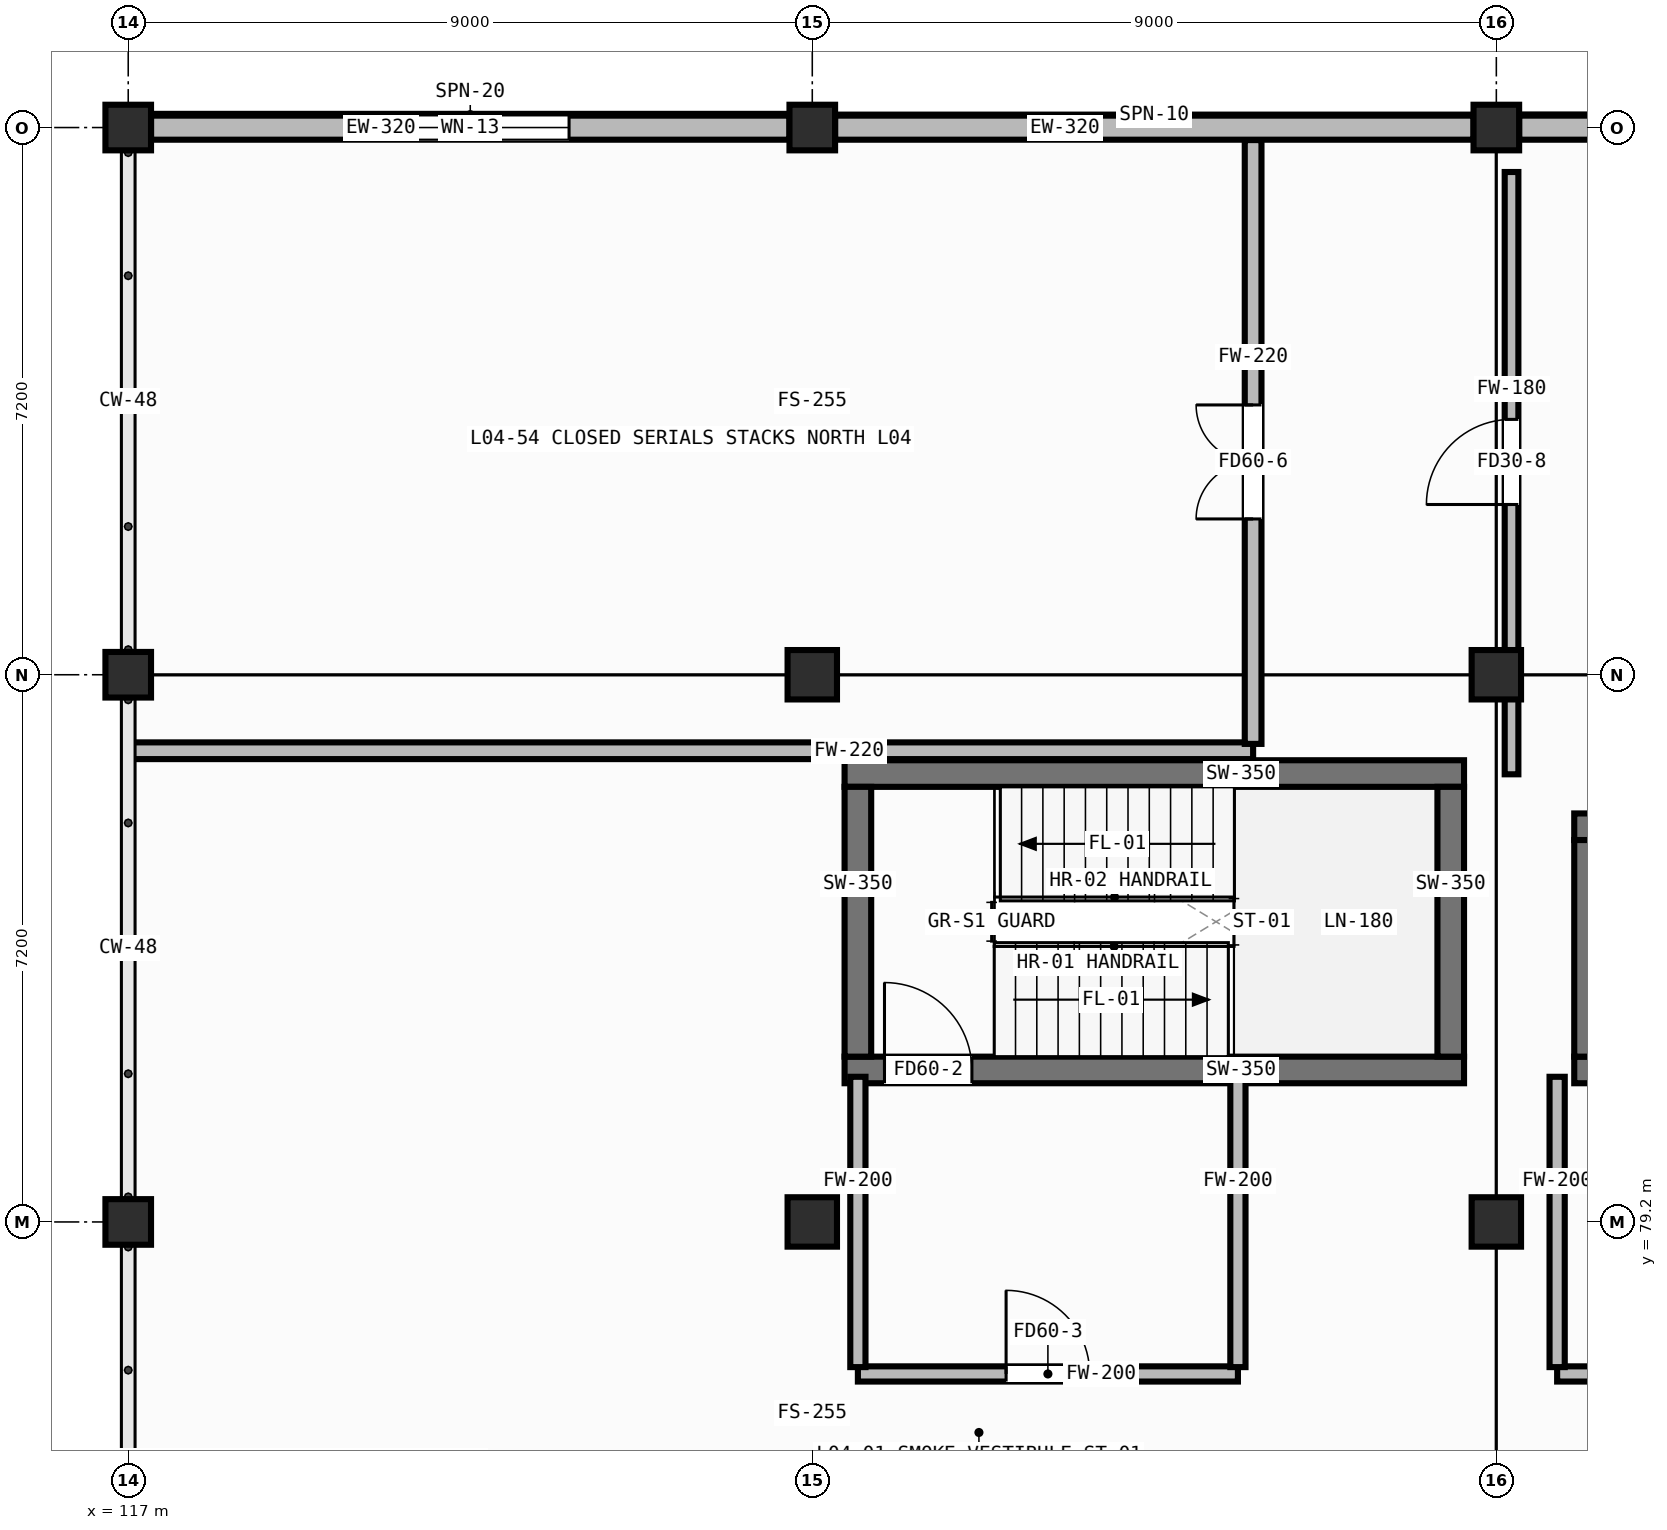
"""IFC4 building model, lengths in metres.
Left out: names, types, materials, properties, quantities, classifications, styles, units other than length and angle.
Written with IfcOpenShell. Run it as: python <this file> out.ifc"""

import sys

from ifc_helpers import new_model, si_unit, direction, frame, frame_2d, origin, origin_2d, place, context, subcontext, project, spatial, rectangle, hollow_rectangle, extrude, element, fill, save


model = new_model("IFC4")
c1 = context("Model", 3, precision=1e-05, world=origin(), true_north=direction((0.0, 1.0)))
c2 = subcontext(c1, "Body", "Model", "MODEL_VIEW")
j1 = project(units=[si_unit("LENGTHUNIT", "METRE"), si_unit("PLANEANGLEUNIT", "RADIAN")], contexts=[c1])
p1 = place(None, origin())
s1 = spatial("IfcSite", under=j1, at=p1, CompositionType="ELEMENT")
p2 = place(p1, origin())
s2 = spatial("IfcBuilding", under=s1, at=p2, CompositionType="ELEMENT")
p3 = place(p2, frame((0.0, 0.0, 12.8)))
s3 = spatial("IfcBuildingStorey", under=s2, at=p3, CompositionType="ELEMENT", Elevation=12.8)
for number, where, z_axis, x_axis in (
    (1, (117.0, 79.2, 0.0), (0.0, 0.0, 1.0), (1.0, 0.0, 0.0)),
    (2, (117.0, 86.4, 0.0), (0.0, 0.0, 1.0), (1.0, 0.0, 0.0)),
    (3, (117.0, 93.6, 0.0), (0.0, 0.0, 1.0), (1.0, 0.0, 0.0)),
):
    element("IfcColumn", number, at=place(p3, frame(where, z_axis=z_axis, x_axis=x_axis)), inside=s3, PredefinedType="COLUMN", context=c2, shape_type="SweptSolid", body=[
        extrude(hollow_rectangle(XDim=0.6, YDim=0.6, WallThickness=0.025, at=origin_2d()), origin(), (0.0, 0.0, 1.0), 4.2),
    ])
for number, where, z_axis, x_axis in (
    (4, (126.0, 79.2, 0.0), (0.0, 0.0, 1.0), (1.0, 0.0, 0.0)),
    (5, (126.0, 86.4, 0.0), (0.0, 0.0, 1.0), (1.0, 0.0, 0.0)),
):
    element("IfcColumn", number, at=place(p3, frame(where, z_axis=z_axis, x_axis=x_axis)), inside=s3, PredefinedType="COLUMN", context=c2, shape_type="SweptSolid", body=[
        extrude(hollow_rectangle(XDim=0.65, YDim=0.65, WallThickness=0.025, at=origin_2d()), origin(), (0.0, 0.0, 1.0), 4.2),
    ])
p4 = place(p3, frame((126.0, 93.6, 0.0), z_axis=(0.0, 0.0, 1.0), x_axis=(1.0, 0.0, 0.0)))
e6 = element("IfcColumn", 6, at=p4, inside=s3, PredefinedType="COLUMN", context=c2, shape_type="SweptSolid", body=[
    extrude(hollow_rectangle(XDim=0.6, YDim=0.6, WallThickness=0.025, at=origin_2d()), origin(), (0.0, 0.0, 1.0), 4.2),
])
for number, where, z_axis, x_axis in (
    (7, (135.0, 79.2, 0.0), (0.0, 0.0, 1.0), (1.0, 0.0, 0.0)),
    (8, (135.0, 86.4, 0.0), (0.0, 0.0, 1.0), (1.0, 0.0, 0.0)),
):
    element("IfcColumn", number, at=place(p3, frame(where, z_axis=z_axis, x_axis=x_axis)), inside=s3, PredefinedType="COLUMN", context=c2, shape_type="SweptSolid", body=[
        extrude(hollow_rectangle(XDim=0.65, YDim=0.65, WallThickness=0.025, at=origin_2d()), origin(), (0.0, 0.0, 1.0), 4.2),
    ])
p5 = place(p3, frame((135.0, 93.6, 0.0), z_axis=(0.0, 0.0, 1.0), x_axis=(1.0, 0.0, 0.0)))
e9 = element("IfcColumn", 9, at=p5, inside=s3, PredefinedType="COLUMN", context=c2, shape_type="SweptSolid", body=[
    extrude(hollow_rectangle(XDim=0.6, YDim=0.6, WallThickness=0.025, at=origin_2d()), origin(), (0.0, 0.0, 1.0), 4.2),
])
p6 = place(p3, frame((125.7, 93.6, 0.0), z_axis=(0.0, 0.0, 1.0), x_axis=(-1.0, 0.0, 0.0)))
e10 = element("IfcWall", 10, at=p6, inside=s3, PredefinedType="STANDARD", context=c2, shape_type="SweptSolid", body=[
    extrude(rectangle(XDim=8.4, YDim=0.32, at=frame_2d((4.2, 0.0))), origin(), (0.0, 0.0, 1.0), 3.49),
])
p7 = place(p6, frame((2.9, 0.0, 0.85)))
e11 = element("IfcOpeningElement", 11, at=p7, cuts=e10, PredefinedType="OPENING", context=c2, shape_type="SweptSolid", body=[
    extrude(rectangle(XDim=2.6, YDim=1.6, at=frame_2d((1.3, 0.8))), frame((0.0, 0.172, 0.0), z_axis=(0.0, -1.0, 0.0), x_axis=(1.0, 0.0, 0.0)), (0.0, 0.0, 1.0), 0.344),
])
p8 = place(p3, frame((134.7, 93.6, 0.0), z_axis=(0.0, 0.0, 1.0), x_axis=(-1.0, 0.0, 0.0)))
e12 = element("IfcWall", 12, at=p8, inside=s3, PredefinedType="STANDARD", context=c2, shape_type="SweptSolid", body=[
    extrude(rectangle(XDim=8.4, YDim=0.32, at=frame_2d((4.2, 0.0))), origin(), (0.0, 0.0, 1.0), 3.49),
])
p9 = place(p3, frame((143.7, 93.6, 0.0), z_axis=(0.0, 0.0, 1.0), x_axis=(-1.0, 0.0, 0.0)))
e13 = element("IfcWall", 13, at=p9, inside=s3, PredefinedType="STANDARD", context=c2, shape_type="SweptSolid", body=[
    extrude(rectangle(XDim=8.4, YDim=0.32, at=frame_2d((4.2, 0.0))), origin(), (0.0, 0.0, 1.0), 3.49),
])
p10 = place(p9, frame((2.9, 0.0, 0.85)))
e14 = element("IfcOpeningElement", 14, at=p10, cuts=e13, PredefinedType="OPENING", context=c2, shape_type="SweptSolid", body=[
    extrude(rectangle(XDim=2.6, YDim=1.6, at=frame_2d((1.3, 0.8))), frame((0.0, 0.172, 0.0), z_axis=(0.0, -1.0, 0.0), x_axis=(1.0, 0.0, 0.0)), (0.0, 0.0, 1.0), 0.344),
])
p11 = place(p3, frame((126.425, 81.2, 0.0), z_axis=(0.0, 0.0, 1.0), x_axis=(1.0, 0.0, 0.0)))
e15 = element("IfcWall", 15, at=p11, inside=s3, PredefinedType="SHEAR", context=c2, shape_type="SweptSolid", body=[
    extrude(rectangle(XDim=8.15, YDim=0.35, at=frame_2d((4.075, 0.0))), origin(), (0.0, 0.0, 1.0), 3.94),
])
p12 = place(p11, frame((0.525, 0.0, 0.0)))
e16 = element("IfcOpeningElement", 16, at=p12, cuts=e15, PredefinedType="OPENING", context=c2, shape_type="SweptSolid", body=[
    extrude(rectangle(XDim=1.15, YDim=2.1, at=frame_2d((0.575, 1.05))), frame((0.0, 0.187, 0.0), z_axis=(0.0, -1.0, 0.0), x_axis=(1.0, 0.0, 0.0)), (0.0, 0.0, 1.0), 0.374),
])
p13 = place(p3, frame((126.425, 85.1, 0.0), z_axis=(0.0, 0.0, 1.0), x_axis=(1.0, 0.0, 0.0)))
e17 = element("IfcWall", 17, at=p13, inside=s3, PredefinedType="SHEAR", context=c2, shape_type="SweptSolid", body=[
    extrude(rectangle(XDim=8.15, YDim=0.35, at=frame_2d((4.075, 0.0))), origin(), (0.0, 0.0, 1.0), 3.94),
])
for number, where, z_axis, x_axis in (
    (18, (126.6, 81.375, 0.0), (0.0, 0.0, 1.0), (0.0, 1.0, 0.0)),
    (19, (134.4, 81.375, 0.0), (0.0, 0.0, 1.0), (0.0, 1.0, 0.0)),
):
    element("IfcWall", number, at=place(p3, frame(where, z_axis=z_axis, x_axis=x_axis)), inside=s3, PredefinedType="SHEAR", context=c2, shape_type="SweptSolid", body=[
        extrude(rectangle(XDim=3.55, YDim=0.35, at=frame_2d((1.775, 0.0))), origin(), (0.0, 0.0, 1.0), 3.94),
    ])
p14 = place(p3, frame((136.025, 81.2, 0.0), z_axis=(0.0, 0.0, 1.0), x_axis=(1.0, 0.0, 0.0)))
e20 = element("IfcWall", 20, at=p14, inside=s3, PredefinedType="SHEAR", context=c2, shape_type="SweptSolid", body=[
    extrude(rectangle(XDim=2.75, YDim=0.35, at=frame_2d((1.375, 0.0))), origin(), (0.0, 0.0, 1.0), 3.94),
])
p15 = place(p14, frame((0.8, 0.0, 0.0)))
e21 = element("IfcOpeningElement", 21, at=p15, cuts=e20, PredefinedType="OPENING", context=c2, shape_type="SweptSolid", body=[
    extrude(rectangle(XDim=1.15, YDim=2.12, at=frame_2d((0.575, 1.06))), frame((0.0, 0.187, 0.0), z_axis=(0.0, -1.0, 0.0), x_axis=(1.0, 0.0, 0.0)), (0.0, 0.0, 1.0), 0.374),
])
p16 = place(p3, frame((136.025, 84.4, 0.0), z_axis=(0.0, 0.0, 1.0), x_axis=(1.0, 0.0, 0.0)))
e22 = element("IfcWall", 22, at=p16, inside=s3, PredefinedType="SHEAR", context=c2, shape_type="SweptSolid", body=[
    extrude(rectangle(XDim=2.75, YDim=0.35, at=frame_2d((1.375, 0.0))), origin(), (0.0, 0.0, 1.0), 3.94),
])
p17 = place(p3, frame((136.2, 81.375, 0.0), z_axis=(0.0, 0.0, 1.0), x_axis=(0.0, 1.0, 0.0)))
e23 = element("IfcWall", 23, at=p17, inside=s3, PredefinedType="SHEAR", context=c2, shape_type="SweptSolid", body=[
    extrude(rectangle(XDim=2.85, YDim=0.35, at=frame_2d((1.425, 0.0))), origin(), (0.0, 0.0, 1.0), 3.94),
])
p18 = place(p3, frame((126.6, 77.2, 0.0), z_axis=(0.0, 0.0, 1.0), x_axis=(1.0, 0.0, 0.0)))
e24 = element("IfcWall", 24, at=p18, inside=s3, PredefinedType="PARTITIONING", context=c2, shape_type="SweptSolid", body=[
    extrude(rectangle(XDim=5.0, YDim=0.2, at=frame_2d((2.5, 0.0))), origin(), (0.0, 0.0, 1.0), 3.94),
])
p19 = place(p18, frame((1.95, 0.0, 0.0)))
e25 = element("IfcOpeningElement", 25, at=p19, cuts=e24, PredefinedType="OPENING", context=c2, shape_type="SweptSolid", body=[
    extrude(rectangle(XDim=1.1, YDim=2.08, at=frame_2d((0.55, 1.04))), frame((0.0, 0.112, 0.0), z_axis=(0.0, -1.0, 0.0), x_axis=(1.0, 0.0, 0.0)), (0.0, 0.0, 1.0), 0.224),
])
for number, where, z_axis, x_axis in (
    (26, (126.6, 77.29, 0.0), (0.0, 0.0, 1.0), (0.0, 1.0, 0.0)),
    (27, (131.6, 77.29, 0.0), (0.0, 0.0, 1.0), (0.0, 1.0, 0.0)),
):
    element("IfcWall", number, at=place(p3, frame(where, z_axis=z_axis, x_axis=x_axis)), inside=s3, PredefinedType="PARTITIONING", context=c2, shape_type="SweptSolid", body=[
        extrude(rectangle(XDim=3.82, YDim=0.2, at=frame_2d((1.91, 0.0))), origin(), (0.0, 0.0, 1.0), 3.94),
    ])
p20 = place(p3, frame((135.8, 77.2, 0.0), z_axis=(0.0, 0.0, 1.0), x_axis=(1.0, 0.0, 0.0)))
e28 = element("IfcWall", 28, at=p20, inside=s3, PredefinedType="PARTITIONING", context=c2, shape_type="SweptSolid", body=[
    extrude(rectangle(XDim=7.8, YDim=0.2, at=frame_2d((3.9, 0.0))), origin(), (0.0, 0.0, 1.0), 3.94),
])
p21 = place(p20, frame((3.1, 0.0, 0.0)))
e29 = element("IfcOpeningElement", 29, at=p21, cuts=e28, PredefinedType="OPENING", context=c2, shape_type="SweptSolid", body=[
    extrude(rectangle(XDim=1.2, YDim=2.1, at=frame_2d((0.6, 1.05))), frame((0.0, 0.112, 0.0), z_axis=(0.0, -1.0, 0.0), x_axis=(1.0, 0.0, 0.0)), (0.0, 0.0, 1.0), 0.224),
])
p22 = place(p3, frame((135.8, 77.29, 0.0), z_axis=(0.0, 0.0, 1.0), x_axis=(0.0, 1.0, 0.0)))
e30 = element("IfcWall", 30, at=p22, inside=s3, PredefinedType="PARTITIONING", context=c2, shape_type="SweptSolid", body=[
    extrude(rectangle(XDim=3.82, YDim=0.2, at=frame_2d((1.91, 0.0))), origin(), (0.0, 0.0, 1.0), 3.94),
])
p23 = place(p3, frame((117.035, 85.4, 0.0), z_axis=(0.0, 0.0, 1.0), x_axis=(1.0, 0.0, 0.0)))
e31 = element("IfcWall", 31, at=p23, inside=s3, PredefinedType="PARTITIONING", context=c2, shape_type="SweptSolid", body=[
    extrude(rectangle(XDim=14.765, YDim=0.22, at=frame_2d((7.383, 0.0))), origin(), (0.0, 0.0, 1.0), 3.94),
])
p24 = place(p3, frame((131.8, 85.49, 0.0), z_axis=(0.0, 0.0, 1.0), x_axis=(0.0, 1.0, 0.0)))
e32 = element("IfcWall", 32, at=p24, inside=s3, PredefinedType="PARTITIONING", context=c2, shape_type="SweptSolid", body=[
    extrude(rectangle(XDim=7.945, YDim=0.22, at=frame_2d((3.973, 0.0))), origin(), (0.0, 0.0, 1.0), 3.94),
])
p25 = place(p24, frame((2.96, 0.0, 0.0)))
e33 = element("IfcOpeningElement", 33, at=p25, cuts=e32, PredefinedType="OPENING", context=c2, shape_type="SweptSolid", body=[
    extrude(rectangle(XDim=1.5, YDim=2.1, at=frame_2d((0.75, 1.05))), frame((0.0, 0.122, 0.0), z_axis=(0.0, -1.0, 0.0), x_axis=(1.0, 0.0, 0.0)), (0.0, 0.0, 1.0), 0.244),
])
p26 = place(p3, frame((135.2, 85.09, 0.0), z_axis=(0.0, 0.0, 1.0), x_axis=(0.0, 1.0, 0.0)))
e34 = element("IfcWall", 34, at=p26, inside=s3, PredefinedType="PARTITIONING", context=c2, shape_type="SweptSolid", body=[
    extrude(rectangle(XDim=7.925, YDim=0.18, at=frame_2d((3.962, 0.0))), origin(), (0.0, 0.0, 1.0), 3.22),
])
p27 = place(p26, frame((3.55, 0.0, 0.0)))
e35 = element("IfcOpeningElement", 35, at=p27, cuts=e34, PredefinedType="OPENING", context=c2, shape_type="SweptSolid", body=[
    extrude(rectangle(XDim=1.12, YDim=2.08, at=frame_2d((0.56, 1.04))), frame((0.0, 0.102, 0.0), z_axis=(0.0, -1.0, 0.0), x_axis=(1.0, 0.0, 0.0)), (0.0, 0.0, 1.0), 0.204),
])
p28 = place(p7, origin())
e36 = element("IfcWindow", 36, at=p28, inside=s3, PartitioningType="DOUBLE_PANEL_VERTICAL", PredefinedType="WINDOW", context=c2, shape_type="SweptSolid", body=[
    extrude(rectangle(XDim=2.6, YDim=1.6, at=frame_2d((1.3, 0.8))), frame((0.0, 0.03, 0.0), z_axis=(0.0, -1.0, 0.0), x_axis=(1.0, 0.0, 0.0)), (0.0, 0.0, 1.0), 0.06),
])
fill(e11, e36)
p29 = place(p12, origin())
e37 = element("IfcDoor", 37, at=p29, inside=s3, OperationType="SINGLE_SWING_LEFT", PredefinedType="DOOR", context=c2, shape_type="SweptSolid", body=[
    extrude(rectangle(XDim=1.15, YDim=2.1, at=frame_2d((0.575, 1.05))), frame((0.0, 0.025, 0.0), z_axis=(0.0, -1.0, 0.0), x_axis=(1.0, 0.0, 0.0)), (0.0, 0.0, 1.0), 0.05),
])
fill(e16, e37)
p30 = place(p19, origin())
e38 = element("IfcDoor", 38, at=p30, inside=s3, OperationType="SINGLE_SWING_LEFT", PredefinedType="DOOR", context=c2, shape_type="SweptSolid", body=[
    extrude(rectangle(XDim=1.1, YDim=2.08, at=frame_2d((0.55, 1.04))), frame((0.0, 0.025, 0.0), z_axis=(0.0, -1.0, 0.0), x_axis=(1.0, 0.0, 0.0)), (0.0, 0.0, 1.0), 0.05),
])
fill(e25, e38)
p31 = place(p25, origin())
e39 = element("IfcDoor", 39, at=p31, inside=s3, OperationType="DOUBLE_DOOR_SINGLE_SWING", PredefinedType="DOOR", context=c2, shape_type="SweptSolid", body=[
    extrude(rectangle(XDim=1.5, YDim=2.1, at=frame_2d((0.75, 1.05))), frame((0.0, 0.025, 0.0), z_axis=(0.0, -1.0, 0.0), x_axis=(1.0, 0.0, 0.0)), (0.0, 0.0, 1.0), 0.05),
])
fill(e33, e39)
p32 = place(p27, origin())
e40 = element("IfcDoor", 40, at=p32, inside=s3, OperationType="SINGLE_SWING_LEFT", PredefinedType="DOOR", context=c2, shape_type="SweptSolid", body=[
    extrude(rectangle(XDim=1.12, YDim=2.08, at=frame_2d((0.56, 1.04))), frame((0.0, 0.025, 0.0), z_axis=(0.0, -1.0, 0.0), x_axis=(1.0, 0.0, 0.0)), (0.0, 0.0, 1.0), 0.05),
])
fill(e35, e40)
save(model, sys.argv[1])
